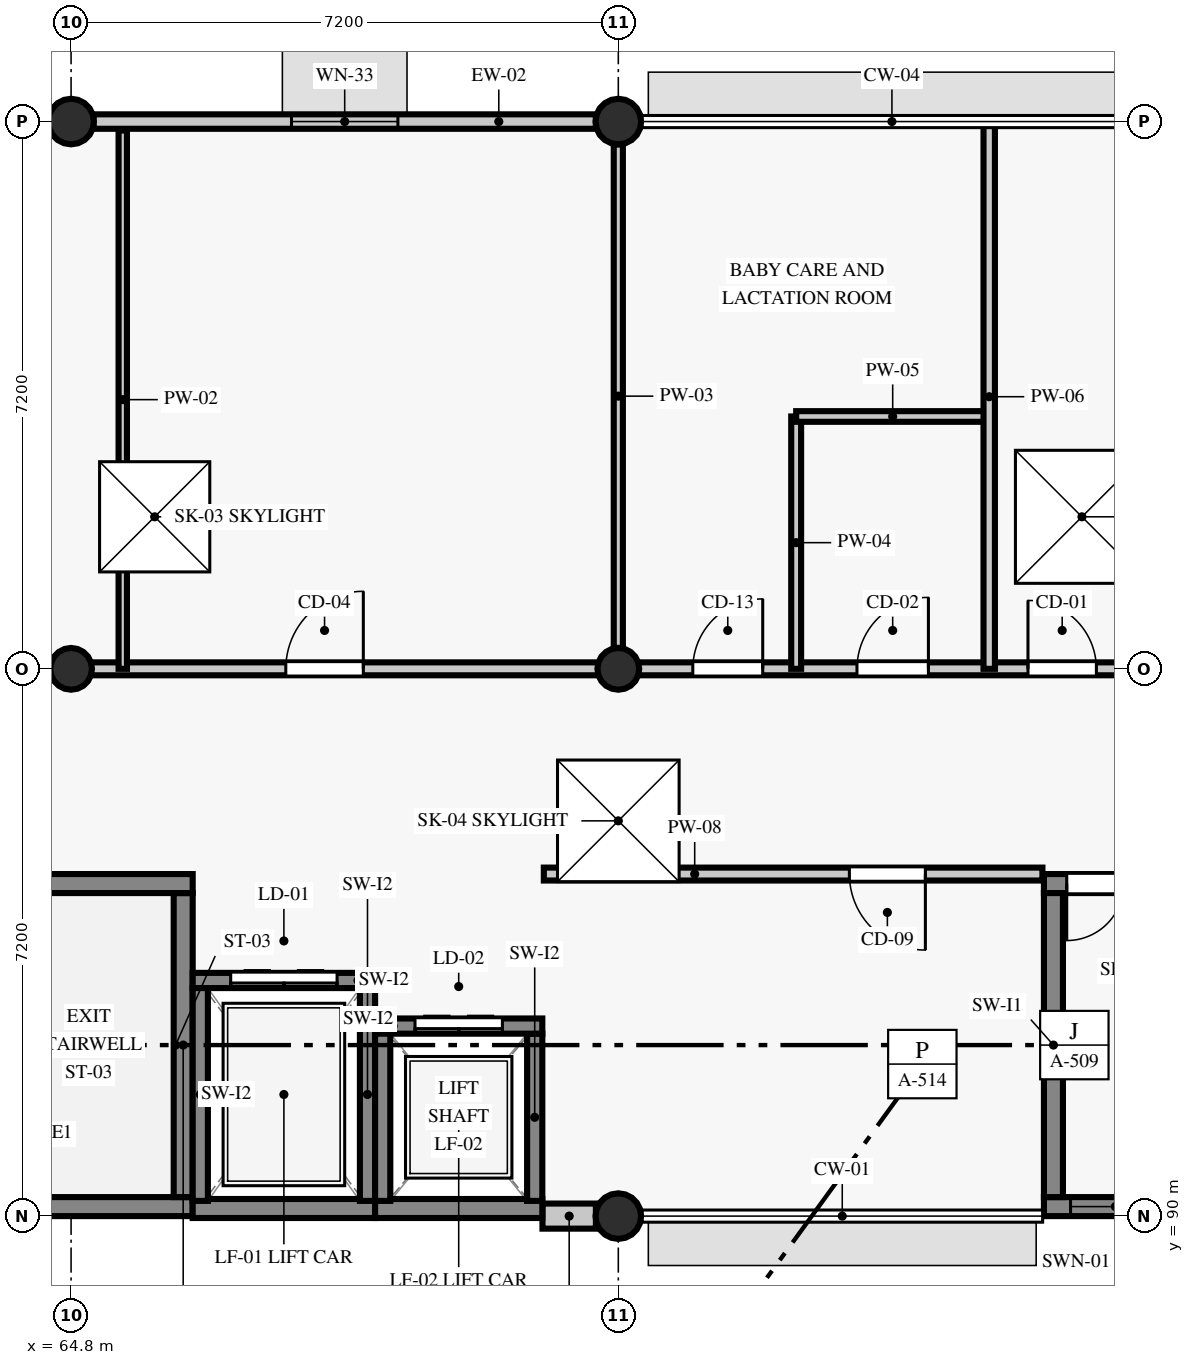
"""IFC4 building model, lengths in metres.
Left out: names, types, materials, properties, quantities, classifications, styles, units other than length and angle.
Written with IfcOpenShell. Run it as: python <this file> out.ifc"""

import sys

from ifc_helpers import new_model, si_unit, direction, frame, frame_2d, origin, origin_2d, place, context, subcontext, project, spatial, rectangle, circle, extrude, element, fill, save


model = new_model("IFC4")
c1 = context("Model", 3, precision=1e-05, world=origin(), true_north=direction((0.0, 1.0)))
c2 = subcontext(c1, "Body", "Model", "MODEL_VIEW")
j1 = project(units=[si_unit("LENGTHUNIT", "METRE"), si_unit("PLANEANGLEUNIT", "RADIAN")], contexts=[c1])
p1 = place(None, origin())
s1 = spatial("IfcSite", under=j1, at=p1, CompositionType="ELEMENT")
p2 = place(p1, origin())
s2 = spatial("IfcBuilding", under=s1, at=p2, CompositionType="ELEMENT")
p3 = place(p2, frame((0.0, 0.0, 22.2)))
s3 = spatial("IfcBuildingStorey", under=s2, at=p3, CompositionType="ELEMENT", Elevation=22.2)
p4 = place(p3, frame((64.8, 97.2, 0.0), z_axis=(0.0, 0.0, 1.0), x_axis=(1.0, 0.0, 0.0)))
e1 = element("IfcColumn", 1, at=p4, inside=s3, PredefinedType="COLUMN", context=c2, shape_type="SweptSolid", body=[
    extrude(circle(Radius=0.275, at=origin_2d()), origin(), (0.0, 0.0, 1.0), 3.975),
])
for number, where, z_axis, x_axis in (
    (2, (64.8, 104.4, 0.0), (0.0, 0.0, 1.0), (1.0, 0.0, 0.0)),
    (3, (72.0, 90.0, 0.0), (0.0, 0.0, 1.0), (1.0, 0.0, 0.0)),
):
    element("IfcColumn", number, at=place(p3, frame(where, z_axis=z_axis, x_axis=x_axis)), inside=s3, PredefinedType="COLUMN", context=c2, shape_type="SweptSolid", body=[
        extrude(circle(Radius=0.3, at=origin_2d()), origin(), (0.0, 0.0, 1.0), 3.975),
    ])
p5 = place(p3, frame((72.0, 97.2, 0.0), z_axis=(0.0, 0.0, 1.0), x_axis=(1.0, 0.0, 0.0)))
e4 = element("IfcColumn", 4, at=p5, inside=s3, PredefinedType="COLUMN", context=c2, shape_type="SweptSolid", body=[
    extrude(circle(Radius=0.275, at=origin_2d()), origin(), (0.0, 0.0, 1.0), 3.975),
])
p6 = place(p3, frame((72.0, 104.4, 0.0), z_axis=(0.0, 0.0, 1.0), x_axis=(1.0, 0.0, 0.0)))
e5 = element("IfcColumn", 5, at=p6, inside=s3, PredefinedType="COLUMN", context=c2, shape_type="SweptSolid", body=[
    extrude(circle(Radius=0.3, at=origin_2d()), origin(), (0.0, 0.0, 1.0), 3.975),
])
p7 = place(p3, frame((71.002, 90.0, 0.0), z_axis=(0.0, 0.0, 1.0), x_axis=(1.0, 0.0, 0.0)))
e6 = element("IfcWall", 6, at=p7, inside=s3, PredefinedType="STANDARD", context=c2, shape_type="SweptSolid", body=[
    extrude(rectangle(XDim=0.703, YDim=0.33, at=frame_2d((0.352, 0.0))), origin(), (0.0, 0.0, 1.0), 3.975),
])
p8 = place(p3, frame((71.705, 104.4, 0.0), z_axis=(0.0, 0.0, 1.0), x_axis=(-1.0, 0.0, 0.0)))
e7 = element("IfcWall", 7, at=p8, inside=s3, PredefinedType="STANDARD", context=c2, shape_type="SweptSolid", body=[
    extrude(rectangle(XDim=6.61, YDim=0.19, at=frame_2d((3.305, 0.0))), origin(), (0.0, 0.0, 1.0), 3.325),
])
p9 = place(p8, frame((2.605, 0.0, 0.9)))
e8 = element("IfcOpeningElement", 8, at=p9, cuts=e7, PredefinedType="OPENING", context=c2, shape_type="SweptSolid", body=[
    extrude(rectangle(XDim=1.4, YDim=1.66, at=frame_2d((0.7, 0.83))), frame((0.0, 0.105, 0.0), z_axis=(0.0, -1.0, 0.0), x_axis=(1.0, 0.0, 0.0)), (0.0, 0.0, 1.0), 0.21),
])
p10 = place(p3, frame((57.6, 90.125, 0.0), z_axis=(0.0, 0.0, 1.0), x_axis=(1.0, 0.0, 0.0)))
e9 = element("IfcWall", 9, at=p10, inside=s3, PredefinedType="SHEAR", context=c2, shape_type="SweptSolid", body=[
    extrude(rectangle(XDim=8.8, YDim=0.25, at=frame_2d((4.4, 0.0))), origin(), (0.0, 0.0, 1.0), 3.975),
])
p11 = place(p10, frame((0.35, 0.0, 0.92)))
e10 = element("IfcOpeningElement", 10, at=p11, cuts=e9, PredefinedType="OPENING", context=c2, shape_type="SweptSolid", body=[
    extrude(rectangle(XDim=1.18, YDim=1.48, at=frame_2d((0.59, 0.74))), frame((0.0, 0.135, 0.0), z_axis=(0.0, -1.0, 0.0), x_axis=(1.0, 0.0, 0.0)), (0.0, 0.0, 1.0), 0.27),
])
p12 = place(p3, frame((66.275, 90.25, 0.0), z_axis=(0.0, 0.0, 1.0), x_axis=(0.0, 1.0, 0.0)))
e11 = element("IfcWall", 11, at=p12, inside=s3, PredefinedType="SHEAR", context=c2, shape_type="SweptSolid", body=[
    extrude(rectangle(XDim=4.0, YDim=0.25, at=frame_2d((2.0, 0.0))), origin(), (0.0, 0.0, 1.0), 3.975),
])
p13 = place(p3, frame((66.4, 94.375, 0.0), z_axis=(0.0, 0.0, 1.0), x_axis=(-1.0, 0.0, 0.0)))
e12 = element("IfcWall", 12, at=p13, inside=s3, PredefinedType="SHEAR", context=c2, shape_type="SweptSolid", body=[
    extrude(rectangle(XDim=8.8, YDim=0.25, at=frame_2d((4.4, 0.0))), origin(), (0.0, 0.0, 1.0), 3.975),
])
p14 = place(p13, frame((7.0, 0.0, 0.0)))
e13 = element("IfcOpeningElement", 13, at=p14, cuts=e12, PredefinedType="OPENING", context=c2, shape_type="SweptSolid", body=[
    extrude(rectangle(XDim=1.5, YDim=2.15, at=frame_2d((0.75, 1.075))), frame((0.0, 0.135, 0.0), z_axis=(0.0, -1.0, 0.0), x_axis=(1.0, 0.0, 0.0)), (0.0, 0.0, 1.0), 0.27),
])
p15 = place(p3, frame((77.6, 90.125, 0.0), z_axis=(0.0, 0.0, 1.0), x_axis=(1.0, 0.0, 0.0)))
e14 = element("IfcWall", 14, at=p15, inside=s3, PredefinedType="SHEAR", context=c2, shape_type="SweptSolid", body=[
    extrude(rectangle(XDim=8.8, YDim=0.25, at=frame_2d((4.4, 0.0))), origin(), (0.0, 0.0, 1.0), 3.975),
])
p16 = place(p15, frame((0.35, 0.0, 0.92)))
e15 = element("IfcOpeningElement", 15, at=p16, cuts=e14, PredefinedType="OPENING", context=c2, shape_type="SweptSolid", body=[
    extrude(rectangle(XDim=1.18, YDim=1.48, at=frame_2d((0.59, 0.74))), frame((0.0, 0.135, 0.0), z_axis=(0.0, -1.0, 0.0), x_axis=(1.0, 0.0, 0.0)), (0.0, 0.0, 1.0), 0.27),
])
p17 = place(p3, frame((86.4, 94.375, 0.0), z_axis=(0.0, 0.0, 1.0), x_axis=(-1.0, 0.0, 0.0)))
e16 = element("IfcWall", 16, at=p17, inside=s3, PredefinedType="SHEAR", context=c2, shape_type="SweptSolid", body=[
    extrude(rectangle(XDim=8.8, YDim=0.25, at=frame_2d((4.4, 0.0))), origin(), (0.0, 0.0, 1.0), 3.975),
])
p18 = place(p17, frame((7.0, 0.0, 0.0)))
e17 = element("IfcOpeningElement", 17, at=p18, cuts=e16, PredefinedType="OPENING", context=c2, shape_type="SweptSolid", body=[
    extrude(rectangle(XDim=1.5, YDim=2.15, at=frame_2d((0.75, 1.075))), frame((0.0, 0.135, 0.0), z_axis=(0.0, -1.0, 0.0), x_axis=(1.0, 0.0, 0.0)), (0.0, 0.0, 1.0), 0.27),
])
p19 = place(p3, frame((77.725, 94.25, 0.0), z_axis=(0.0, 0.0, 1.0), x_axis=(0.0, -1.0, 0.0)))
e18 = element("IfcWall", 18, at=p19, inside=s3, PredefinedType="SHEAR", context=c2, shape_type="SweptSolid", body=[
    extrude(rectangle(XDim=4.0, YDim=0.25, at=frame_2d((2.0, 0.0))), origin(), (0.0, 0.0, 1.0), 3.975),
])
p20 = place(p3, frame((66.4, 90.1, 0.0), z_axis=(0.0, 0.0, 1.0), x_axis=(1.0, 0.0, 0.0)))
e19 = element("IfcWall", 19, at=p20, inside=s3, PredefinedType="SHEAR", context=c2, shape_type="SweptSolid", body=[
    extrude(rectangle(XDim=2.4, YDim=0.25, at=frame_2d((1.2, 0.0))), origin(), (0.0, 0.0, 1.0), 3.975),
])
p21 = place(p3, frame((68.7, 90.2, 0.0), z_axis=(0.0, 0.0, 1.0), x_axis=(0.0, 1.0, 0.0)))
e20 = element("IfcWall", 20, at=p21, inside=s3, PredefinedType="SHEAR", context=c2, shape_type="SweptSolid", body=[
    extrude(rectangle(XDim=2.8, YDim=0.2, at=frame_2d((1.4, 0.0))), origin(), (0.0, 0.0, 1.0), 3.975),
])
p22 = place(p3, frame((68.8, 93.1, 0.0), z_axis=(0.0, 0.0, 1.0), x_axis=(-1.0, 0.0, 0.0)))
e21 = element("IfcWall", 21, at=p22, inside=s3, PredefinedType="SHEAR", context=c2, shape_type="SweptSolid", body=[
    extrude(rectangle(XDim=2.4, YDim=0.2, at=frame_2d((1.2, 0.0))), origin(), (0.0, 0.0, 1.0), 3.975),
])
p23 = place(p22, frame((0.5, 0.0, 0.0)))
e22 = element("IfcOpeningElement", 22, at=p23, cuts=e21, PredefinedType="OPENING", context=c2, shape_type="SweptSolid", body=[
    extrude(rectangle(XDim=1.4, YDim=2.15, at=frame_2d((0.7, 1.075))), frame((0.0, 0.11, 0.0), z_axis=(0.0, -1.0, 0.0), x_axis=(1.0, 0.0, 0.0)), (0.0, 0.0, 1.0), 0.22),
])
p24 = place(p3, frame((66.5, 93.0, 0.0), z_axis=(0.0, 0.0, 1.0), x_axis=(0.0, -1.0, 0.0)))
e23 = element("IfcWall", 23, at=p24, inside=s3, PredefinedType="SHEAR", context=c2, shape_type="SweptSolid", body=[
    extrude(rectangle(XDim=2.8, YDim=0.2, at=frame_2d((1.4, 0.0))), origin(), (0.0, 0.0, 1.0), 3.975),
])
p25 = place(p3, frame((68.8, 90.1, 0.0), z_axis=(0.0, 0.0, 1.0), x_axis=(1.0, 0.0, 0.0)))
e24 = element("IfcWall", 24, at=p25, inside=s3, PredefinedType="SHEAR", context=c2, shape_type="SweptSolid", body=[
    extrude(rectangle(XDim=2.2, YDim=0.25, at=frame_2d((1.1, 0.0))), origin(), (0.0, 0.0, 1.0), 3.975),
])
p26 = place(p3, frame((70.9, 90.2, 0.0), z_axis=(0.0, 0.0, 1.0), x_axis=(0.0, 1.0, 0.0)))
e25 = element("IfcWall", 25, at=p26, inside=s3, PredefinedType="SHEAR", context=c2, shape_type="SweptSolid", body=[
    extrude(rectangle(XDim=2.2, YDim=0.2, at=frame_2d((1.1, 0.0))), origin(), (0.0, 0.0, 1.0), 3.975),
])
p27 = place(p3, frame((71.0, 92.5, 0.0), z_axis=(0.0, 0.0, 1.0), x_axis=(-1.0, 0.0, 0.0)))
e26 = element("IfcWall", 26, at=p27, inside=s3, PredefinedType="SHEAR", context=c2, shape_type="SweptSolid", body=[
    extrude(rectangle(XDim=2.2, YDim=0.2, at=frame_2d((1.1, 0.0))), origin(), (0.0, 0.0, 1.0), 3.975),
])
p28 = place(p27, frame((0.525, 0.0, 0.0)))
e27 = element("IfcOpeningElement", 27, at=p28, cuts=e26, PredefinedType="OPENING", context=c2, shape_type="SweptSolid", body=[
    extrude(rectangle(XDim=1.15, YDim=2.15, at=frame_2d((0.575, 1.075))), frame((0.0, 0.11, 0.0), z_axis=(0.0, -1.0, 0.0), x_axis=(1.0, 0.0, 0.0)), (0.0, 0.0, 1.0), 0.22),
])
p29 = place(p3, frame((68.9, 92.4, 0.0), z_axis=(0.0, 0.0, 1.0), x_axis=(0.0, -1.0, 0.0)))
e28 = element("IfcWall", 28, at=p29, inside=s3, PredefinedType="SHEAR", context=c2, shape_type="SweptSolid", body=[
    extrude(rectangle(XDim=2.2, YDim=0.2, at=frame_2d((1.1, 0.0))), origin(), (0.0, 0.0, 1.0), 3.975),
])
p30 = place(p3, frame((57.9, 97.2, 0.0), z_axis=(0.0, 0.0, 1.0), x_axis=(1.0, 0.0, 0.0)))
e29 = element("IfcWall", 29, at=p30, inside=s3, PredefinedType="PARTITIONING", context=c2, shape_type="SweptSolid", body=[
    extrude(rectangle(XDim=28.2, YDim=0.17, at=frame_2d((14.1, 0.0))), origin(), (0.0, 0.0, 1.0), 3.225),
])
p31 = place(p30, frame((2.428, 0.0, 0.0)))
e30 = element("IfcOpeningElement", 30, at=p31, cuts=e29, PredefinedType="OPENING", context=c2, shape_type="SweptSolid", body=[
    extrude(rectangle(XDim=0.98, YDim=2.08, at=frame_2d((0.49, 1.04))), frame((0.0, 0.095, 0.0), z_axis=(0.0, -1.0, 0.0), x_axis=(1.0, 0.0, 0.0)), (0.0, 0.0, 1.0), 0.19),
])
p32 = place(p30, frame((9.725, 0.0, 0.0)))
e31 = element("IfcOpeningElement", 31, at=p32, cuts=e29, PredefinedType="OPENING", context=c2, shape_type="SweptSolid", body=[
    extrude(rectangle(XDim=1.02, YDim=2.08, at=frame_2d((0.51, 1.04))), frame((0.0, 0.095, 0.0), z_axis=(0.0, -1.0, 0.0), x_axis=(1.0, 0.0, 0.0)), (0.0, 0.0, 1.0), 0.19),
])
p33 = place(p30, frame((15.08, 0.0, 0.0)))
e32 = element("IfcOpeningElement", 32, at=p33, cuts=e29, PredefinedType="OPENING", context=c2, shape_type="SweptSolid", body=[
    extrude(rectangle(XDim=0.92, YDim=2.18, at=frame_2d((0.46, 1.09))), frame((0.0, 0.095, 0.0), z_axis=(0.0, -1.0, 0.0), x_axis=(1.0, 0.0, 0.0)), (0.0, 0.0, 1.0), 0.19),
])
p34 = place(p30, frame((17.24, 0.0, 0.0)))
e33 = element("IfcOpeningElement", 33, at=p34, cuts=e29, PredefinedType="OPENING", context=c2, shape_type="SweptSolid", body=[
    extrude(rectangle(XDim=0.94, YDim=2.08, at=frame_2d((0.47, 1.04))), frame((0.0, 0.095, 0.0), z_axis=(0.0, -1.0, 0.0), x_axis=(1.0, 0.0, 0.0)), (0.0, 0.0, 1.0), 0.19),
])
p35 = place(p30, frame((19.49, 0.0, 0.0)))
e34 = element("IfcOpeningElement", 34, at=p35, cuts=e29, PredefinedType="OPENING", context=c2, shape_type="SweptSolid", body=[
    extrude(rectangle(XDim=0.9, YDim=2.08, at=frame_2d((0.45, 1.04))), frame((0.0, 0.095, 0.0), z_axis=(0.0, -1.0, 0.0), x_axis=(1.0, 0.0, 0.0)), (0.0, 0.0, 1.0), 0.19),
])
p36 = place(p30, frame((24.382, 0.0, 0.0)))
e35 = element("IfcOpeningElement", 35, at=p36, cuts=e29, PredefinedType="OPENING", context=c2, shape_type="SweptSolid", body=[
    extrude(rectangle(XDim=0.95, YDim=2.13, at=frame_2d((0.475, 1.065))), frame((0.0, 0.095, 0.0), z_axis=(0.0, -1.0, 0.0), x_axis=(1.0, 0.0, 0.0)), (0.0, 0.0, 1.0), 0.19),
])
p37 = place(p3, frame((65.48, 97.2, 0.0), z_axis=(0.0, 0.0, 1.0), x_axis=(0.0, 1.0, 0.0)))
e36 = element("IfcWall", 36, at=p37, inside=s3, PredefinedType="PARTITIONING", context=c2, shape_type="SweptSolid", body=[
    extrude(rectangle(XDim=7.083, YDim=0.11, at=frame_2d((3.542, 0.0))), origin(), (0.0, 0.0, 1.0), 3.225),
])
p38 = place(p3, frame((72.0, 97.475, 0.0), z_axis=(0.0, 0.0, 1.0), x_axis=(0.0, 1.0, 0.0)))
e37 = element("IfcWall", 37, at=p38, inside=s3, PredefinedType="PARTITIONING", context=c2, shape_type="SweptSolid", body=[
    extrude(rectangle(XDim=6.625, YDim=0.12, at=frame_2d((3.312, 0.0))), origin(), (0.0, 0.0, 1.0), 3.425),
])
p39 = place(p3, frame((74.34, 97.2, 0.0), z_axis=(0.0, 0.0, 1.0), x_axis=(0.0, 1.0, 0.0)))
e38 = element("IfcWall", 38, at=p39, inside=s3, PredefinedType="PARTITIONING", context=c2, shape_type="SweptSolid", body=[
    extrude(rectangle(XDim=3.32, YDim=0.13, at=frame_2d((1.66, 0.0))), origin(), (0.0, 0.0, 1.0), 3.225),
])
p40 = place(p3, frame((74.34, 100.52, 0.0), z_axis=(0.0, 0.0, 1.0), x_axis=(1.0, 0.0, 0.0)))
e39 = element("IfcWall", 39, at=p40, inside=s3, PredefinedType="PARTITIONING", context=c2, shape_type="SweptSolid", body=[
    extrude(rectangle(XDim=2.54, YDim=0.14, at=frame_2d((1.27, 0.0))), origin(), (0.0, 0.0, 1.0), 3.975),
])
p41 = place(p3, frame((76.88, 97.2, 0.0), z_axis=(0.0, 0.0, 1.0), x_axis=(0.0, 1.0, 0.0)))
e40 = element("IfcWall", 40, at=p41, inside=s3, PredefinedType="PARTITIONING", context=c2, shape_type="SweptSolid", body=[
    extrude(rectangle(XDim=7.16, YDim=0.15, at=frame_2d((3.58, 0.0))), origin(), (0.0, 0.0, 1.0), 3.225),
])
p42 = place(p3, frame((71.02, 94.5, 0.0), z_axis=(0.0, 0.0, 1.0), x_axis=(1.0, 0.0, 0.0)))
e41 = element("IfcWall", 41, at=p42, inside=s3, PredefinedType="PARTITIONING", context=c2, shape_type="SweptSolid", body=[
    extrude(rectangle(XDim=6.56, YDim=0.17, at=frame_2d((3.28, 0.0))), origin(), (0.0, 0.0, 1.0), 3.425),
])
p43 = place(p42, frame((4.02, 0.0, 0.0)))
e42 = element("IfcOpeningElement", 42, at=p43, cuts=e41, PredefinedType="OPENING", context=c2, shape_type="SweptSolid", body=[
    extrude(rectangle(XDim=1.0, YDim=2.13, at=frame_2d((0.5, 1.065))), frame((0.0, 0.095, 0.0), z_axis=(0.0, -1.0, 0.0), x_axis=(1.0, 0.0, 0.0)), (0.0, 0.0, 1.0), 0.19),
])
p44 = place(p9, origin())
e43 = element("IfcWindow", 43, at=p44, inside=s3, PartitioningType="SINGLE_PANEL", PredefinedType="WINDOW", context=c2, shape_type="SweptSolid", body=[
    extrude(rectangle(XDim=1.4, YDim=1.66, at=frame_2d((0.7, 0.83))), frame((0.0, 0.03, 0.0), z_axis=(0.0, -1.0, 0.0), x_axis=(1.0, 0.0, 0.0)), (0.0, 0.0, 1.0), 0.06),
])
fill(e8, e43)
p45 = place(p2, frame((0.0, 0.0, 26.4)))
p46 = place(p45, frame((0.0, 0.0, -0.225)))
p47 = place(p46, frame((65.9, 99.2, 0.0)))
p48 = place(p47, frame((0.0, 0.0, 0.175)))
e44 = element("IfcWindow", 44, at=p48, inside=s3, PartitioningType="SINGLE_PANEL", PredefinedType="SKYLIGHT", context=c2, shape_type="SweptSolid", body=[
    extrude(rectangle(XDim=1.45, YDim=1.45, at=origin_2d()), origin(), (0.0, 0.0, 1.0), 0.05),
])
p49 = place(p46, frame((72.0, 95.2, 0.0)))
p50 = place(p49, frame((0.0, 0.0, 0.175)))
e45 = element("IfcWindow", 45, at=p50, inside=s3, PartitioningType="SINGLE_PANEL", PredefinedType="SKYLIGHT", context=c2, shape_type="SweptSolid", body=[
    extrude(rectangle(XDim=1.6, YDim=1.6, at=origin_2d()), origin(), (0.0, 0.0, 1.0), 0.05),
])
p51 = place(p46, frame((78.1, 99.2, 0.0)))
p52 = place(p51, frame((0.0, 0.0, 0.175)))
e46 = element("IfcWindow", 46, at=p52, inside=s3, PartitioningType="SINGLE_PANEL", PredefinedType="SKYLIGHT", context=c2, shape_type="SweptSolid", body=[
    extrude(rectangle(XDim=1.75, YDim=1.75, at=origin_2d()), origin(), (0.0, 0.0, 1.0), 0.05),
])
p53 = place(p16, origin())
e47 = element("IfcWindow", 47, at=p53, inside=s3, PartitioningType="SINGLE_PANEL", PredefinedType="WINDOW", context=c2, shape_type="SweptSolid", body=[
    extrude(rectangle(XDim=1.18, YDim=1.48, at=frame_2d((0.59, 0.74))), frame((0.0, 0.03, 0.0), z_axis=(0.0, -1.0, 0.0), x_axis=(1.0, 0.0, 0.0)), (0.0, 0.0, 1.0), 0.06),
])
fill(e15, e47)
p54 = place(p18, origin())
e48 = element("IfcDoor", 48, at=p54, inside=s3, OperationType="DOUBLE_DOOR_SINGLE_SWING", PredefinedType="DOOR", context=c2, shape_type="SweptSolid", body=[
    extrude(rectangle(XDim=1.5, YDim=2.15, at=frame_2d((0.75, 1.075))), frame((0.0, 0.025, 0.0), z_axis=(0.0, -1.0, 0.0), x_axis=(1.0, 0.0, 0.0)), (0.0, 0.0, 1.0), 0.05),
])
fill(e17, e48)
p55 = place(p23, frame((1.4, 0.0, 0.0), z_axis=(0.0, 0.0, 1.0), x_axis=(-1.0, 0.0, 0.0)))
e49 = element("IfcDoor", 49, at=p55, inside=s3, OperationType="DOUBLE_DOOR_SLIDING", PredefinedType="DOOR", context=c2, shape_type="SweptSolid", body=[
    extrude(rectangle(XDim=1.4, YDim=2.15, at=frame_2d((0.7, 1.075))), frame((0.0, 0.025, 0.0), z_axis=(0.0, -1.0, 0.0), x_axis=(1.0, 0.0, 0.0)), (0.0, 0.0, 1.0), 0.05),
])
fill(e22, e49)
p56 = place(p28, frame((1.15, 0.0, 0.0), z_axis=(0.0, 0.0, 1.0), x_axis=(-1.0, 0.0, 0.0)))
e50 = element("IfcDoor", 50, at=p56, inside=s3, OperationType="DOUBLE_DOOR_SLIDING", PredefinedType="DOOR", context=c2, shape_type="SweptSolid", body=[
    extrude(rectangle(XDim=1.15, YDim=2.15, at=frame_2d((0.575, 1.075))), frame((0.0, 0.025, 0.0), z_axis=(0.0, -1.0, 0.0), x_axis=(1.0, 0.0, 0.0)), (0.0, 0.0, 1.0), 0.05),
])
fill(e27, e50)
p57 = place(p32, origin())
e51 = element("IfcDoor", 51, at=p57, inside=s3, OperationType="SINGLE_SWING_RIGHT", PredefinedType="DOOR", context=c2, shape_type="SweptSolid", body=[
    extrude(rectangle(XDim=1.02, YDim=2.08, at=frame_2d((0.51, 1.04))), frame((0.0, 0.025, 0.0), z_axis=(0.0, -1.0, 0.0), x_axis=(1.0, 0.0, 0.0)), (0.0, 0.0, 1.0), 0.05),
])
fill(e31, e51)
p58 = place(p33, origin())
e52 = element("IfcDoor", 52, at=p58, inside=s3, OperationType="SINGLE_SWING_RIGHT", PredefinedType="DOOR", context=c2, shape_type="SweptSolid", body=[
    extrude(rectangle(XDim=0.92, YDim=2.18, at=frame_2d((0.46, 1.09))), frame((0.0, 0.025, 0.0), z_axis=(0.0, -1.0, 0.0), x_axis=(1.0, 0.0, 0.0)), (0.0, 0.0, 1.0), 0.05),
])
fill(e32, e52)
p59 = place(p34, origin())
e53 = element("IfcDoor", 53, at=p59, inside=s3, OperationType="SINGLE_SWING_RIGHT", PredefinedType="DOOR", context=c2, shape_type="SweptSolid", body=[
    extrude(rectangle(XDim=0.94, YDim=2.08, at=frame_2d((0.47, 1.04))), frame((0.0, 0.025, 0.0), z_axis=(0.0, -1.0, 0.0), x_axis=(1.0, 0.0, 0.0)), (0.0, 0.0, 1.0), 0.05),
])
fill(e33, e53)
p60 = place(p35, origin())
e54 = element("IfcDoor", 54, at=p60, inside=s3, OperationType="SINGLE_SWING_LEFT", PredefinedType="DOOR", context=c2, shape_type="SweptSolid", body=[
    extrude(rectangle(XDim=0.9, YDim=2.08, at=frame_2d((0.45, 1.04))), frame((0.0, 0.025, 0.0), z_axis=(0.0, -1.0, 0.0), x_axis=(1.0, 0.0, 0.0)), (0.0, 0.0, 1.0), 0.05),
])
fill(e34, e54)
p61 = place(p43, frame((1.0, 0.0, 0.0), z_axis=(0.0, 0.0, 1.0), x_axis=(-1.0, 0.0, 0.0)))
e55 = element("IfcDoor", 55, at=p61, inside=s3, OperationType="SINGLE_SWING_LEFT", PredefinedType="DOOR", context=c2, shape_type="SweptSolid", body=[
    extrude(rectangle(XDim=1.0, YDim=2.13, at=frame_2d((0.5, 1.065))), frame((0.0, 0.025, 0.0), z_axis=(0.0, -1.0, 0.0), x_axis=(1.0, 0.0, 0.0)), (0.0, 0.0, 1.0), 0.05),
])
fill(e42, e55)
save(model, sys.argv[1])
